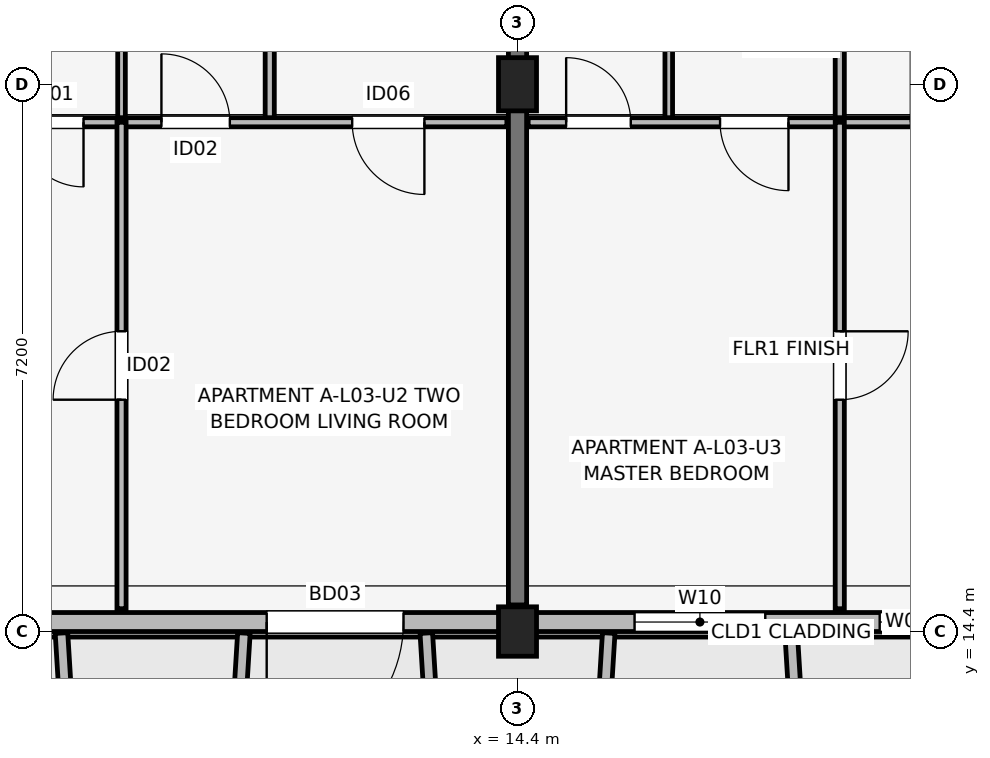
"""IFC4 building model, lengths in metres.
Left out: names, types, materials, properties, quantities, classifications, styles, units other than length and angle.
Written with IfcOpenShell. Run it as: python <this file> out.ifc"""

import sys

from ifc_helpers import new_model, si_unit, direction, frame, frame_2d, origin, origin_2d, place, context, subcontext, project, spatial, rectangle, extrude, element, fill, save


model = new_model("IFC4")
c1 = context("Model", 3, precision=1e-05, world=origin(), true_north=direction((0.0, 1.0)))
c2 = subcontext(c1, "Body", "Model", "MODEL_VIEW")
j1 = project(units=[si_unit("LENGTHUNIT", "METRE"), si_unit("PLANEANGLEUNIT", "RADIAN")], contexts=[c1])
p1 = place(None, origin())
s1 = spatial("IfcSite", under=j1, at=p1, CompositionType="ELEMENT")
p2 = place(p1, origin())
s2 = spatial("IfcBuilding", under=s1, at=p2, CompositionType="ELEMENT")
p3 = place(p2, frame((0.0, 0.0, 11.85)))
s3 = spatial("IfcBuildingStorey", under=s2, at=p3, CompositionType="ELEMENT", Elevation=11.85)
p4 = place(p3, frame((14.4, 14.4, 0.0), z_axis=(0.0, 0.0, 1.0), x_axis=(1.0, 0.0, 0.0)))
e1 = element("IfcColumn", 1, at=p4, inside=s3, PredefinedType="COLUMN", context=c2, shape_type="SweptSolid", body=[
    extrude(rectangle(XDim=0.5, YDim=0.65, at=origin_2d()), origin(), (0.0, 0.0, 1.0), 3.15),
])
p5 = place(p3, frame((14.4, 21.6, 0.0), z_axis=(0.0, 0.0, 1.0), x_axis=(1.0, 0.0, 0.0)))
e2 = element("IfcColumn", 2, at=p5, inside=s3, PredefinedType="COLUMN", context=c2, shape_type="SweptSolid", body=[
    extrude(rectangle(XDim=0.5, YDim=0.7, at=origin_2d()), origin(), (0.0, 0.0, 1.0), 3.15),
])
p6 = place(p3, frame((14.4, 14.75, 0.0), z_axis=(0.0, 0.0, 1.0), x_axis=(0.0, 1.0, 0.0)))
e3 = element("IfcWall", 3, at=p6, inside=s3, PredefinedType="SHEAR", context=c2, shape_type="SweptSolid", body=[
    extrude(rectangle(XDim=9.4, YDim=0.24, at=frame_2d((4.7, 0.0))), origin(), (0.0, 0.0, 1.0), 3.15),
])
p7 = place(p3, frame((3.4, 14.525, 0.0), z_axis=(0.0, 0.0, 1.0), x_axis=(1.0, 0.0, 0.0)))
e4 = element("IfcWall", 4, at=p7, inside=s3, PredefinedType="SOLIDWALL", context=c2, shape_type="SweptSolid", body=[
    extrude(rectangle(XDim=29.2, YDim=0.25, at=frame_2d((14.6, 0.0))), origin(), (0.0, 0.0, 1.0), 2.43),
])
p8 = place(p7, frame((9.5, 0.0, 0.0), z_axis=(0.0, 0.0, 1.0), x_axis=(-1.0, 0.0, 0.0)))
e5 = element("IfcOpeningElement", 5, at=p8, cuts=e4, PredefinedType="OPENING", context=c2, shape_type="SweptSolid", body=[
    extrude(rectangle(XDim=1.8, YDim=2.15, at=frame_2d((0.9, 1.075))), frame((0.0, 0.135, 0.0), z_axis=(0.0, -1.0, 0.0), x_axis=(1.0, 0.0, 0.0)), (0.0, 0.0, 1.0), 0.27),
])
p9 = place(p7, frame((23.825, 0.0, 0.0), z_axis=(0.0, 0.0, 1.0), x_axis=(-1.0, 0.0, 0.0)))
e6 = element("IfcOpeningElement", 6, at=p9, cuts=e4, PredefinedType="OPENING", context=c2, shape_type="SweptSolid", body=[
    extrude(rectangle(XDim=1.65, YDim=2.15, at=frame_2d((0.825, 1.075))), frame((0.0, 0.135, 0.0), z_axis=(0.0, -1.0, 0.0), x_axis=(1.0, 0.0, 0.0)), (0.0, 0.0, 1.0), 0.27),
])
p10 = place(p7, frame((2.755, 0.0, 0.75)))
e7 = element("IfcOpeningElement", 7, at=p10, cuts=e4, PredefinedType="OPENING", context=c2, shape_type="SweptSolid", body=[
    extrude(rectangle(XDim=0.6, YDim=1.25, at=frame_2d((0.3, 0.625))), frame((0.0, 0.135, 0.0), z_axis=(0.0, -1.0, 0.0), x_axis=(1.0, 0.0, 0.0)), (0.0, 0.0, 1.0), 0.27),
])
p11 = place(p7, frame((4.245, 0.0, 0.75)))
e8 = element("IfcOpeningElement", 8, at=p11, cuts=e4, PredefinedType="OPENING", context=c2, shape_type="SweptSolid", body=[
    extrude(rectangle(XDim=0.6, YDim=1.25, at=frame_2d((0.3, 0.625))), frame((0.0, 0.135, 0.0), z_axis=(0.0, -1.0, 0.0), x_axis=(1.0, 0.0, 0.0)), (0.0, 0.0, 1.0), 0.27),
])
p12 = place(p7, frame((12.54, 0.0, 0.7)))
e9 = element("IfcOpeningElement", 9, at=p12, cuts=e4, PredefinedType="OPENING", context=c2, shape_type="SweptSolid", body=[
    extrude(rectangle(XDim=1.72, YDim=1.6, at=frame_2d((0.86, 0.8))), frame((0.0, 0.135, 0.0), z_axis=(0.0, -1.0, 0.0), x_axis=(1.0, 0.0, 0.0)), (0.0, 0.0, 1.0), 0.27),
])
p13 = place(p7, frame((15.765, 0.0, 0.75)))
e10 = element("IfcOpeningElement", 10, at=p13, cuts=e4, PredefinedType="OPENING", context=c2, shape_type="SweptSolid", body=[
    extrude(rectangle(XDim=0.72, YDim=1.35, at=frame_2d((0.36, 0.675))), frame((0.0, 0.135, 0.0), z_axis=(0.0, -1.0, 0.0), x_axis=(1.0, 0.0, 0.0)), (0.0, 0.0, 1.0), 0.27),
])
p14 = place(p7, frame((19.555, 0.0, 0.75)))
e11 = element("IfcOpeningElement", 11, at=p14, cuts=e4, PredefinedType="OPENING", context=c2, shape_type="SweptSolid", body=[
    extrude(rectangle(XDim=0.72, YDim=1.35, at=frame_2d((0.36, 0.675))), frame((0.0, 0.135, 0.0), z_axis=(0.0, -1.0, 0.0), x_axis=(1.0, 0.0, 0.0)), (0.0, 0.0, 1.0), 0.27),
])
p15 = place(p7, frame((25.845, 0.0, 0.75)))
e12 = element("IfcOpeningElement", 12, at=p15, cuts=e4, PredefinedType="OPENING", context=c2, shape_type="SweptSolid", body=[
    extrude(rectangle(XDim=0.6, YDim=1.25, at=frame_2d((0.3, 0.625))), frame((0.0, 0.135, 0.0), z_axis=(0.0, -1.0, 0.0), x_axis=(1.0, 0.0, 0.0)), (0.0, 0.0, 1.0), 0.27),
])
p16 = place(p7, frame((27.68, 0.0, 0.75)))
e13 = element("IfcOpeningElement", 13, at=p16, cuts=e4, PredefinedType="OPENING", context=c2, shape_type="SweptSolid", body=[
    extrude(rectangle(XDim=1.1, YDim=1.5, at=frame_2d((0.55, 0.75))), frame((0.0, 0.135, 0.0), z_axis=(0.0, -1.0, 0.0), x_axis=(1.0, 0.0, 0.0)), (0.0, 0.0, 1.0), 0.27),
])
for number, where, z_axis, x_axis in (
    (14, (8.4, 14.38, 0.0), (0.0, 0.0, 1.0), (0.061, -0.998, 0.0)),
    (15, (10.8, 14.38, 0.0), (0.0, 0.0, 1.0), (-0.061, -0.998, 0.0)),
    (16, (13.2, 14.38, 0.0), (0.0, 0.0, 1.0), (0.061, -0.998, 0.0)),
):
    element("IfcWall", number, at=place(p3, frame(where, z_axis=z_axis, x_axis=x_axis)), inside=s3, PredefinedType="ELEMENTEDWALL", context=c2, shape_type="SweptSolid", body=[
        extrude(rectangle(XDim=1.964, YDim=0.165, at=frame_2d((0.982, 0.0))), origin(), (0.0, 0.0, 1.0), 2.58),
    ])
for number, where, z_axis, x_axis in (
    (17, (15.6, 14.38, 0.0), (0.0, 0.0, 1.0), (-0.061, -0.998, 0.0)),
    (18, (18.0, 14.38, 0.0), (0.0, 0.0, 1.0), (0.061, -0.998, 0.0)),
):
    element("IfcWall", number, at=place(p3, frame(where, z_axis=z_axis, x_axis=x_axis)), inside=s3, PredefinedType="ELEMENTEDWALL", context=c2, shape_type="SweptSolid", body=[
        extrude(rectangle(XDim=1.964, YDim=0.165, at=frame_2d((0.982, 0.0))), origin(), (0.0, 0.0, 1.0), 2.45),
    ])
p17 = place(p3, frame((9.19, 21.1, 0.0), z_axis=(0.0, 0.0, 1.0), x_axis=(0.0, 1.0, 0.0)))
e19 = element("IfcWall", 19, at=p17, inside=s3, PredefinedType="PARTITIONING", context=c2, shape_type="SweptSolid", body=[
    extrude(rectangle(XDim=3.2, YDim=0.1, at=frame_2d((1.6, 0.0))), origin(), (0.0, 0.0, 1.0), 2.375),
])
p18 = place(p3, frame((11.14, 21.1, 0.0), z_axis=(0.0, 0.0, 1.0), x_axis=(0.0, 1.0, 0.0)))
e20 = element("IfcWall", 20, at=p18, inside=s3, PredefinedType="PARTITIONING", context=c2, shape_type="SweptSolid", body=[
    extrude(rectangle(XDim=3.2, YDim=0.12, at=frame_2d((1.6, 0.0))), origin(), (0.0, 0.0, 1.0), 2.375),
])
p19 = place(p3, frame((7.34, 21.1, 0.0), z_axis=(0.0, 0.0, 1.0), x_axis=(1.0, 0.0, 0.0)))
e21 = element("IfcWall", 21, at=p19, inside=s3, PredefinedType="PARTITIONING", context=c2, shape_type="SweptSolid", body=[
    extrude(rectangle(XDim=6.92, YDim=0.12, at=frame_2d((3.46, 0.0))), origin(), (0.0, 0.0, 1.0), 2.38),
])
p20 = place(p19, frame((1.35, 0.0, 0.0), z_axis=(0.0, 0.0, 1.0), x_axis=(-1.0, 0.0, 0.0)))
e22 = element("IfcOpeningElement", 22, at=p20, cuts=e21, PredefinedType="OPENING", context=c2, shape_type="SweptSolid", body=[
    extrude(rectangle(XDim=0.85, YDim=2.08, at=frame_2d((0.425, 1.04))), frame((0.0, 0.07, 0.0), z_axis=(0.0, -1.0, 0.0), x_axis=(1.0, 0.0, 0.0)), (0.0, 0.0, 1.0), 0.14),
])
p21 = place(p19, frame((2.375, 0.0, 0.0)))
e23 = element("IfcOpeningElement", 23, at=p21, cuts=e21, PredefinedType="OPENING", context=c2, shape_type="SweptSolid", body=[
    extrude(rectangle(XDim=0.9, YDim=2.08, at=frame_2d((0.45, 1.04))), frame((0.0, 0.07, 0.0), z_axis=(0.0, -1.0, 0.0), x_axis=(1.0, 0.0, 0.0)), (0.0, 0.0, 1.0), 0.14),
])
p22 = place(p19, frame((5.835, 0.0, 0.0), z_axis=(0.0, 0.0, 1.0), x_axis=(-1.0, 0.0, 0.0)))
e24 = element("IfcOpeningElement", 24, at=p22, cuts=e21, PredefinedType="OPENING", context=c2, shape_type="SweptSolid", body=[
    extrude(rectangle(XDim=0.95, YDim=2.08, at=frame_2d((0.475, 1.04))), frame((0.0, 0.07, 0.0), z_axis=(0.0, -1.0, 0.0), x_axis=(1.0, 0.0, 0.0)), (0.0, 0.0, 1.0), 0.14),
])
p23 = place(p3, frame((9.19, 14.7, 0.0), z_axis=(0.0, 0.0, 1.0), x_axis=(0.0, 1.0, 0.0)))
e25 = element("IfcWall", 25, at=p23, inside=s3, PredefinedType="PARTITIONING", context=c2, shape_type="SweptSolid", body=[
    extrude(rectangle(XDim=6.4, YDim=0.12, at=frame_2d((3.2, 0.0))), origin(), (0.0, 0.0, 1.0), 2.38),
])
p24 = place(p23, frame((2.75, 0.0, 0.0)))
e26 = element("IfcOpeningElement", 26, at=p24, cuts=e25, PredefinedType="OPENING", context=c2, shape_type="SweptSolid", body=[
    extrude(rectangle(XDim=0.9, YDim=2.08, at=frame_2d((0.45, 1.04))), frame((0.0, 0.07, 0.0), z_axis=(0.0, -1.0, 0.0), x_axis=(1.0, 0.0, 0.0)), (0.0, 0.0, 1.0), 0.14),
])
p25 = place(p3, frame((16.39, 21.1, 0.0), z_axis=(0.0, 0.0, 1.0), x_axis=(0.0, 1.0, 0.0)))
e27 = element("IfcWall", 27, at=p25, inside=s3, PredefinedType="PARTITIONING", context=c2, shape_type="SweptSolid", body=[
    extrude(rectangle(XDim=3.2, YDim=0.1, at=frame_2d((1.6, 0.0))), origin(), (0.0, 0.0, 1.0), 2.375),
])
p26 = place(p3, frame((18.64, 21.1, 0.0), z_axis=(0.0, 0.0, 1.0), x_axis=(0.0, 1.0, 0.0)))
e28 = element("IfcWall", 28, at=p26, inside=s3, PredefinedType="PARTITIONING", context=c2, shape_type="SweptSolid", body=[
    extrude(rectangle(XDim=3.2, YDim=0.12, at=frame_2d((1.6, 0.0))), origin(), (0.0, 0.0, 1.0), 2.375),
])
p27 = place(p3, frame((14.54, 21.1, 0.0), z_axis=(0.0, 0.0, 1.0), x_axis=(1.0, 0.0, 0.0)))
e29 = element("IfcWall", 29, at=p27, inside=s3, PredefinedType="PARTITIONING", context=c2, shape_type="SweptSolid", body=[
    extrude(rectangle(XDim=6.92, YDim=0.12, at=frame_2d((3.46, 0.0))), origin(), (0.0, 0.0, 1.0), 2.38),
])
p28 = place(p27, frame((0.5, 0.0, 0.0)))
e30 = element("IfcOpeningElement", 30, at=p28, cuts=e29, PredefinedType="OPENING", context=c2, shape_type="SweptSolid", body=[
    extrude(rectangle(XDim=0.85, YDim=2.08, at=frame_2d((0.425, 1.04))), frame((0.0, 0.07, 0.0), z_axis=(0.0, -1.0, 0.0), x_axis=(1.0, 0.0, 0.0)), (0.0, 0.0, 1.0), 0.14),
])
p29 = place(p27, frame((3.425, 0.0, 0.0), z_axis=(0.0, 0.0, 1.0), x_axis=(-1.0, 0.0, 0.0)))
e31 = element("IfcOpeningElement", 31, at=p29, cuts=e29, PredefinedType="OPENING", context=c2, shape_type="SweptSolid", body=[
    extrude(rectangle(XDim=0.9, YDim=2.08, at=frame_2d((0.45, 1.04))), frame((0.0, 0.07, 0.0), z_axis=(0.0, -1.0, 0.0), x_axis=(1.0, 0.0, 0.0)), (0.0, 0.0, 1.0), 0.14),
])
p30 = place(p27, frame((5.035, 0.0, 0.0)))
e32 = element("IfcOpeningElement", 32, at=p30, cuts=e29, PredefinedType="OPENING", context=c2, shape_type="SweptSolid", body=[
    extrude(rectangle(XDim=0.95, YDim=2.08, at=frame_2d((0.475, 1.04))), frame((0.0, 0.07, 0.0), z_axis=(0.0, -1.0, 0.0), x_axis=(1.0, 0.0, 0.0)), (0.0, 0.0, 1.0), 0.14),
])
p31 = place(p3, frame((18.64, 14.7, 0.0), z_axis=(0.0, 0.0, 1.0), x_axis=(0.0, 1.0, 0.0)))
e33 = element("IfcWall", 33, at=p31, inside=s3, PredefinedType="PARTITIONING", context=c2, shape_type="SweptSolid", body=[
    extrude(rectangle(XDim=6.4, YDim=0.12, at=frame_2d((3.2, 0.0))), origin(), (0.0, 0.0, 1.0), 2.38),
])
p32 = place(p31, frame((3.65, 0.0, 0.0), z_axis=(0.0, 0.0, 1.0), x_axis=(-1.0, 0.0, 0.0)))
e34 = element("IfcOpeningElement", 34, at=p32, cuts=e33, PredefinedType="OPENING", context=c2, shape_type="SweptSolid", body=[
    extrude(rectangle(XDim=0.9, YDim=2.08, at=frame_2d((0.45, 1.04))), frame((0.0, 0.07, 0.0), z_axis=(0.0, -1.0, 0.0), x_axis=(1.0, 0.0, 0.0)), (0.0, 0.0, 1.0), 0.14),
])
p33 = place(p8, origin())
e35 = element("IfcDoor", 35, at=p33, inside=s3, OperationType="SINGLE_SWING_LEFT", PredefinedType="DOOR", context=c2, shape_type="SweptSolid", body=[
    extrude(rectangle(XDim=1.8, YDim=2.15, at=frame_2d((0.9, 1.075))), frame((0.0, 0.025, 0.0), z_axis=(0.0, -1.0, 0.0), x_axis=(1.0, 0.0, 0.0)), (0.0, 0.0, 1.0), 0.05),
])
fill(e5, e35)
p34 = place(p12, origin())
e36 = element("IfcWindow", 36, at=p34, inside=s3, PartitioningType="SINGLE_PANEL", PredefinedType="WINDOW", context=c2, shape_type="SweptSolid", body=[
    extrude(rectangle(XDim=1.72, YDim=1.6, at=frame_2d((0.86, 0.8))), frame((0.0, 0.03, 0.0), z_axis=(0.0, -1.0, 0.0), x_axis=(1.0, 0.0, 0.0)), (0.0, 0.0, 1.0), 0.06),
])
fill(e9, e36)
p35 = place(p13, origin())
e37 = element("IfcWindow", 37, at=p35, inside=s3, PartitioningType="SINGLE_PANEL", PredefinedType="WINDOW", context=c2, shape_type="SweptSolid", body=[
    extrude(rectangle(XDim=0.72, YDim=1.35, at=frame_2d((0.36, 0.675))), frame((0.0, 0.03, 0.0), z_axis=(0.0, -1.0, 0.0), x_axis=(1.0, 0.0, 0.0)), (0.0, 0.0, 1.0), 0.06),
])
fill(e10, e37)
p36 = place(p20, origin())
e38 = element("IfcDoor", 38, at=p36, inside=s3, OperationType="SINGLE_SWING_RIGHT", PredefinedType="DOOR", context=c2, shape_type="SweptSolid", body=[
    extrude(rectangle(XDim=0.85, YDim=2.08, at=frame_2d((0.425, 1.04))), frame((0.0, 0.025, 0.0), z_axis=(0.0, -1.0, 0.0), x_axis=(1.0, 0.0, 0.0)), (0.0, 0.0, 1.0), 0.05),
])
fill(e22, e38)
p37 = place(p21, origin())
e39 = element("IfcDoor", 39, at=p37, inside=s3, OperationType="SINGLE_SWING_LEFT", PredefinedType="DOOR", context=c2, shape_type="SweptSolid", body=[
    extrude(rectangle(XDim=0.9, YDim=2.08, at=frame_2d((0.45, 1.04))), frame((0.0, 0.025, 0.0), z_axis=(0.0, -1.0, 0.0), x_axis=(1.0, 0.0, 0.0)), (0.0, 0.0, 1.0), 0.05),
])
fill(e23, e39)
p38 = place(p22, origin())
e40 = element("IfcDoor", 40, at=p38, inside=s3, OperationType="SINGLE_SWING_RIGHT", PredefinedType="DOOR", context=c2, shape_type="SweptSolid", body=[
    extrude(rectangle(XDim=0.95, YDim=2.08, at=frame_2d((0.475, 1.04))), frame((0.0, 0.025, 0.0), z_axis=(0.0, -1.0, 0.0), x_axis=(1.0, 0.0, 0.0)), (0.0, 0.0, 1.0), 0.05),
])
fill(e24, e40)
p39 = place(p24, origin())
e41 = element("IfcDoor", 41, at=p39, inside=s3, OperationType="SINGLE_SWING_LEFT", PredefinedType="DOOR", context=c2, shape_type="SweptSolid", body=[
    extrude(rectangle(XDim=0.9, YDim=2.08, at=frame_2d((0.45, 1.04))), frame((0.0, 0.025, 0.0), z_axis=(0.0, -1.0, 0.0), x_axis=(1.0, 0.0, 0.0)), (0.0, 0.0, 1.0), 0.05),
])
fill(e26, e41)
p40 = place(p28, origin())
e42 = element("IfcDoor", 42, at=p40, inside=s3, OperationType="SINGLE_SWING_LEFT", PredefinedType="DOOR", context=c2, shape_type="SweptSolid", body=[
    extrude(rectangle(XDim=0.85, YDim=2.08, at=frame_2d((0.425, 1.04))), frame((0.0, 0.025, 0.0), z_axis=(0.0, -1.0, 0.0), x_axis=(1.0, 0.0, 0.0)), (0.0, 0.0, 1.0), 0.05),
])
fill(e30, e42)
p41 = place(p29, origin())
e43 = element("IfcDoor", 43, at=p41, inside=s3, OperationType="SINGLE_SWING_RIGHT", PredefinedType="DOOR", context=c2, shape_type="SweptSolid", body=[
    extrude(rectangle(XDim=0.9, YDim=2.08, at=frame_2d((0.45, 1.04))), frame((0.0, 0.025, 0.0), z_axis=(0.0, -1.0, 0.0), x_axis=(1.0, 0.0, 0.0)), (0.0, 0.0, 1.0), 0.05),
])
fill(e31, e43)
p42 = place(p32, origin())
e44 = element("IfcDoor", 44, at=p42, inside=s3, OperationType="SINGLE_SWING_RIGHT", PredefinedType="DOOR", context=c2, shape_type="SweptSolid", body=[
    extrude(rectangle(XDim=0.9, YDim=2.08, at=frame_2d((0.45, 1.04))), frame((0.0, 0.025, 0.0), z_axis=(0.0, -1.0, 0.0), x_axis=(1.0, 0.0, 0.0)), (0.0, 0.0, 1.0), 0.05),
])
fill(e34, e44)
save(model, sys.argv[1])
